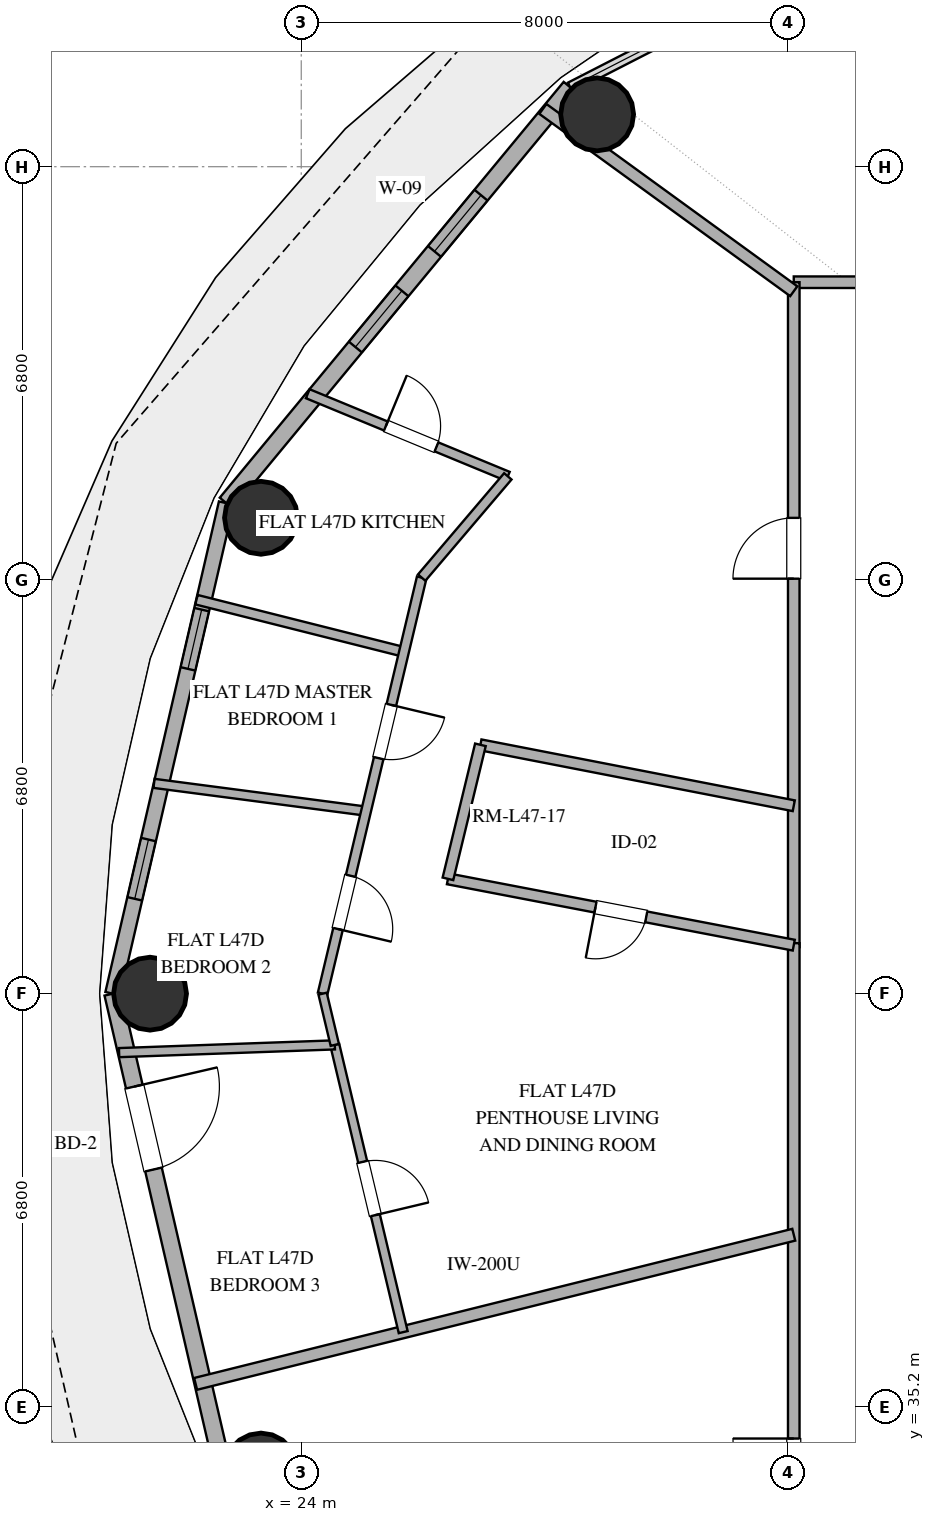
"""IFC4 building model, lengths in metres.
Left out: names, types, materials, properties, quantities, classifications, styles, units other than length and angle.
Written with IfcOpenShell. Run it as: python <this file> out.ifc"""

import sys

from ifc_helpers import new_model, si_unit, direction, frame, frame_2d, origin, origin_2d, place, context, subcontext, project, spatial, rectangle, hollow_circle, extrude, element, fill, save


model = new_model("IFC4")
c1 = context("Model", 3, precision=1e-05, world=origin(), true_north=direction((0.0, 1.0)))
c2 = subcontext(c1, "Body", "Model", "MODEL_VIEW")
j1 = project(units=[si_unit("LENGTHUNIT", "METRE"), si_unit("PLANEANGLEUNIT", "RADIAN")], contexts=[c1])
p1 = place(None, origin())
s1 = spatial("IfcSite", under=j1, at=p1, CompositionType="ELEMENT")
p2 = place(p1, origin())
s2 = spatial("IfcBuilding", under=s1, at=p2, CompositionType="ELEMENT")
p3 = place(p2, frame((0.0, 0.0, 186.6)))
s3 = spatial("IfcBuildingStorey", under=s2, at=p3, CompositionType="ELEMENT", Elevation=186.6)
for number, where, z_axis, x_axis in (
    (1, (28.866, 56.46, 0.0), (0.0, 0.0, 1.0), (1.0, 0.0, 0.0)),
    (2, (23.338, 49.826, 0.0), (0.0, 0.0, 1.0), (1.0, 0.0, 0.0)),
    (3, (21.513, 42.0, 0.0), (0.0, 0.0, 1.0), (1.0, 0.0, 0.0)),
    (4, (23.338, 34.174, 0.0), (0.0, 0.0, 1.0), (1.0, 0.0, 0.0)),
):
    element("IfcColumn", number, at=place(p3, frame(where, z_axis=z_axis, x_axis=x_axis)), inside=s3, PredefinedType="COLUMN", context=c2, shape_type="SweptSolid", body=[
        extrude(hollow_circle(Radius=0.6, WallThickness=0.032, at=origin_2d()), origin(), (0.0, 0.0, 1.0), 3.38),
    ])
p4 = place(p3, frame((28.424, 56.906, 0.0), z_axis=(0.0, 0.0, 1.0), x_axis=(-0.637333477683, -0.770588111915, 0.0)))
e5 = element("IfcWall", 5, at=p4, inside=s3, PredefinedType="SOLIDWALL", context=c2, shape_type="SweptSolid", body=[
    extrude(rectangle(XDim=8.875, YDim=0.28, at=frame_2d((4.438, 0.0))), origin(), (0.0, 0.0, 1.0), 3.38),
])
p5 = place(p4, frame((2.302, 0.0, 0.85)))
e6 = element("IfcOpeningElement", 6, at=p5, cuts=e5, PredefinedType="OPENING", context=c2, shape_type="SweptSolid", body=[
    extrude(rectangle(XDim=1.2, YDim=1.8, at=frame_2d((0.6, 0.9))), frame((0.0, 0.15, 0.0), z_axis=(0.0, -1.0, 0.0), x_axis=(1.0, 0.0, 0.0)), (0.0, 0.0, 1.0), 0.3),
])
p6 = place(p4, frame((4.344, 0.0, 0.85)))
e7 = element("IfcOpeningElement", 7, at=p6, cuts=e5, PredefinedType="OPENING", context=c2, shape_type="SweptSolid", body=[
    extrude(rectangle(XDim=1.2, YDim=1.8, at=frame_2d((0.6, 0.9))), frame((0.0, 0.15, 0.0), z_axis=(0.0, -1.0, 0.0), x_axis=(1.0, 0.0, 0.0)), (0.0, 0.0, 1.0), 0.3),
])
p7 = place(p3, frame((22.768, 50.067, 0.0), z_axis=(0.0, 0.0, 1.0), x_axis=(-0.225473184558, -0.974249374157, 0.0)))
e8 = element("IfcWall", 8, at=p7, inside=s3, PredefinedType="SOLIDWALL", context=c2, shape_type="SweptSolid", body=[
    extrude(rectangle(XDim=8.28, YDim=0.25, at=frame_2d((4.14, 0.0))), origin(), (0.0, 0.0, 1.0), 3.38),
])
p8 = place(p7, frame((1.798, 0.0, 0.35)))
e9 = element("IfcOpeningElement", 9, at=p8, cuts=e8, PredefinedType="OPENING", context=c2, shape_type="SweptSolid", body=[
    extrude(rectangle(XDim=1.0, YDim=1.05, at=frame_2d((0.5, 0.525))), frame((0.0, 0.135, 0.0), z_axis=(0.0, -1.0, 0.0), x_axis=(1.0, 0.0, 0.0)), (0.0, 0.0, 1.0), 0.27),
])
p9 = place(p7, frame((5.679, 0.0, 1.42)))
e10 = element("IfcOpeningElement", 10, at=p9, cuts=e8, PredefinedType="OPENING", context=c2, shape_type="SweptSolid", body=[
    extrude(rectangle(XDim=1.0, YDim=1.05, at=frame_2d((0.5, 0.525))), frame((0.0, 0.135, 0.0), z_axis=(0.0, -1.0, 0.0), x_axis=(1.0, 0.0, 0.0)), (0.0, 0.0, 1.0), 0.27),
])
p10 = place(p3, frame((20.901, 42.0, 0.0), z_axis=(0.0, 0.0, 1.0), x_axis=(0.225473184558, -0.974249374157, 0.0)))
e11 = element("IfcWall", 11, at=p10, inside=s3, PredefinedType="SOLIDWALL", context=c2, shape_type="SweptSolid", body=[
    extrude(rectangle(XDim=8.28, YDim=0.28, at=frame_2d((4.14, 0.0))), origin(), (0.0, 0.0, 1.0), 3.38),
])
p11 = place(p10, frame((1.568, 0.0, 0.0)))
e12 = element("IfcOpeningElement", 12, at=p11, cuts=e11, PredefinedType="OPENING", context=c2, shape_type="SweptSolid", body=[
    extrude(rectangle(XDim=1.4, YDim=2.2, at=frame_2d((0.7, 1.1))), frame((0.0, 0.15, 0.0), z_axis=(0.0, -1.0, 0.0), x_axis=(1.0, 0.0, 0.0)), (0.0, 0.0, 1.0), 0.3),
])
p12 = place(p3, frame((32.1, 53.7, 0.0), z_axis=(0.0, 0.0, 1.0), x_axis=(1.0, 0.0, 0.0)))
e13 = element("IfcWall", 13, at=p12, inside=s3, PredefinedType="PARTITIONING", context=c2, shape_type="SweptSolid", body=[
    extrude(rectangle(XDim=13.016, YDim=0.19, at=frame_2d((6.508, 0.0))), origin(), (0.0, 0.0, 1.0), 2.74),
])
p13 = place(p12, frame((4.199, 0.0, 0.0)))
e14 = element("IfcOpeningElement", 14, at=p13, cuts=e13, PredefinedType="OPENING", context=c2, shape_type="SweptSolid", body=[
    extrude(rectangle(XDim=1.0, YDim=2.2, at=frame_2d((0.5, 1.1))), frame((0.0, 0.105, 0.0), z_axis=(0.0, -1.0, 0.0), x_axis=(1.0, 0.0, 0.0)), (0.0, 0.0, 1.0), 0.21),
])
p14 = place(p3, frame((32.1, 42.765, 0.0), z_axis=(0.0, 0.0, 1.0), x_axis=(0.0, 1.0, 0.0)))
e15 = element("IfcWall", 15, at=p14, inside=s3, PredefinedType="PARTITIONING", context=c2, shape_type="SweptSolid", body=[
    extrude(rectangle(XDim=10.935, YDim=0.19, at=frame_2d((5.467, 0.0))), origin(), (0.0, 0.0, 1.0), 2.74),
])
p15 = place(p14, frame((6.06, 0.0, 0.0)))
e16 = element("IfcOpeningElement", 16, at=p15, cuts=e15, PredefinedType="OPENING", context=c2, shape_type="SweptSolid", body=[
    extrude(rectangle(XDim=1.0, YDim=2.2, at=frame_2d((0.5, 1.1))), frame((0.0, 0.105, 0.0), z_axis=(0.0, -1.0, 0.0), x_axis=(1.0, 0.0, 0.0)), (0.0, 0.0, 1.0), 0.21),
])
p16 = place(p3, frame((32.1, 30.3, 0.0), z_axis=(0.0, 0.0, 1.0), x_axis=(0.0, 1.0, 0.0)))
e17 = element("IfcWall", 17, at=p16, inside=s3, PredefinedType="PARTITIONING", context=c2, shape_type="SweptSolid", body=[
    extrude(rectangle(XDim=12.53, YDim=0.19, at=frame_2d((6.265, 0.0))), origin(), (0.0, 0.0, 1.0), 2.74),
])
p17 = place(p16, frame((3.384, 0.0, 0.0)))
e18 = element("IfcOpeningElement", 18, at=p17, cuts=e17, PredefinedType="OPENING", context=c2, shape_type="SweptSolid", body=[
    extrude(rectangle(XDim=1.0, YDim=2.2, at=frame_2d((0.5, 1.1))), frame((0.0, 0.105, 0.0), z_axis=(0.0, -1.0, 0.0), x_axis=(1.0, 0.0, 0.0)), (0.0, 0.0, 1.0), 0.21),
])
p18 = place(p3, frame((22.263, 35.583, 0.0), z_axis=(0.0, 0.0, 1.0), x_axis=(0.970298114693, 0.241912315983, 0.0)))
e19 = element("IfcWall", 19, at=p18, inside=s3, PredefinedType="PARTITIONING", context=c2, shape_type="SweptSolid", body=[
    extrude(rectangle(XDim=10.138, YDim=0.2, at=frame_2d((5.069, 0.0))), origin(), (0.0, 0.0, 1.0), 2.74),
])
p19 = place(p3, frame((32.1, 42.798, 0.0), z_axis=(0.0, 0.0, 1.0), x_axis=(-0.982107940525, 0.188318860333, 0.0)))
e20 = element("IfcWall", 20, at=p19, inside=s3, PredefinedType="PLUMBINGWALL", context=c2, shape_type="SweptSolid", body=[
    extrude(rectangle(XDim=5.791, YDim=0.18, at=frame_2d((2.896, 0.0))), origin(), (0.0, 0.0, 1.0), 2.74),
])
p20 = place(p19, frame((2.47, 0.0, 0.0)))
e21 = element("IfcOpeningElement", 21, at=p20, cuts=e20, PredefinedType="OPENING", context=c2, shape_type="SweptSolid", body=[
    extrude(rectangle(XDim=0.85, YDim=2.1, at=frame_2d((0.425, 1.05))), frame((0.0, 0.1, 0.0), z_axis=(0.0, -1.0, 0.0), x_axis=(1.0, 0.0, 0.0)), (0.0, 0.0, 1.0), 0.2),
])
p21 = place(p3, frame((26.947, 46.092, 0.0), z_axis=(0.0, 0.0, 1.0), x_axis=(0.981628698507, -0.190801200908, 0.0)))
e22 = element("IfcWall", 22, at=p21, inside=s3, PredefinedType="PLUMBINGWALL", context=c2, shape_type="SweptSolid", body=[
    extrude(rectangle(XDim=5.25, YDim=0.18, at=frame_2d((2.625, 0.0))), origin(), (0.0, 0.0, 1.0), 2.74),
])
p22 = place(p3, frame((32.1, 53.552, 0.0), z_axis=(0.0, 0.0, 1.0), x_axis=(-0.809023715391, 0.587776001496, 0.0)))
e23 = element("IfcWall", 23, at=p22, inside=s3, PredefinedType="PARTITIONING", context=c2, shape_type="SweptSolid", body=[
    extrude(rectangle(XDim=5.1, YDim=0.2, at=frame_2d((2.55, 0.0))), origin(), (0.0, 0.0, 1.0), 2.74),
])
p23 = place(p3, frame((24.552, 41.158, 0.0), z_axis=(0.0, 0.0, 1.0), x_axis=(0.231625058686, -0.972805135774, 0.0)))
e24 = element("IfcWall", 24, at=p23, inside=s3, PredefinedType="PARTITIONING", context=c2, shape_type="SweptSolid", body=[
    extrude(rectangle(XDim=4.856, YDim=0.15, at=frame_2d((2.428, 0.0))), origin(), (0.0, 0.0, 1.0), 2.74),
])
p24 = place(p23, frame((1.978, 0.0, 0.0)))
e25 = element("IfcOpeningElement", 25, at=p24, cuts=e24, PredefinedType="OPENING", context=c2, shape_type="SweptSolid", body=[
    extrude(rectangle(XDim=0.9, YDim=2.1, at=frame_2d((0.45, 1.05))), frame((0.0, 0.085, 0.0), z_axis=(0.0, -1.0, 0.0), x_axis=(1.0, 0.0, 0.0)), (0.0, 0.0, 1.0), 0.17),
])
p25 = place(p3, frame((24.107, 51.866, 0.0), z_axis=(0.0, 0.0, 1.0), x_axis=(0.924309814848, -0.381642982611, 0.0)))
e26 = element("IfcWall", 26, at=p25, inside=s3, PredefinedType="PLUMBINGWALL", context=c2, shape_type="SweptSolid", body=[
    extrude(rectangle(XDim=3.56, YDim=0.16, at=frame_2d((1.78, 0.0))), origin(), (0.0, 0.0, 1.0), 2.74),
])
p26 = place(p25, frame((1.39, 0.0, 0.0)))
e27 = element("IfcOpeningElement", 27, at=p26, cuts=e26, PredefinedType="OPENING", context=c2, shape_type="SweptSolid", body=[
    extrude(rectangle(XDim=0.9, YDim=2.1, at=frame_2d((0.45, 1.05))), frame((0.0, 0.09, 0.0), z_axis=(0.0, -1.0, 0.0), x_axis=(1.0, 0.0, 0.0)), (0.0, 0.0, 1.0), 0.18),
])
p27 = place(p3, frame((24.552, 41.158, 0.0), z_axis=(0.0, 0.0, 1.0), x_axis=(-0.999355385726, -0.035900042072, 0.0)))
e28 = element("IfcWall", 28, at=p27, inside=s3, PredefinedType="PARTITIONING", context=c2, shape_type="SweptSolid", body=[
    extrude(rectangle(XDim=3.55, YDim=0.15, at=frame_2d((1.775, 0.0))), origin(), (0.0, 0.0, 1.0), 2.74),
])
p28 = place(p3, frame((22.277, 48.479, 0.0), z_axis=(0.0, 0.0, 1.0), x_axis=(0.969720683394, -0.244216699259, 0.0)))
e29 = element("IfcWall", 29, at=p28, inside=s3, PredefinedType="PLUMBINGWALL", context=c2, shape_type="SweptSolid", body=[
    extrude(rectangle(XDim=3.519, YDim=0.16, at=frame_2d((1.759, 0.0))), origin(), (0.0, 0.0, 1.0), 2.74),
])
p29 = place(p3, frame((21.579, 45.458, 0.0), z_axis=(0.0, 0.0, 1.0), x_axis=(0.991540311483, -0.129799116729, 0.0)))
e30 = element("IfcWall", 30, at=p29, inside=s3, PredefinedType="PARTITIONING", context=c2, shape_type="SweptSolid", body=[
    extrude(rectangle(XDim=3.517, YDim=0.15, at=frame_2d((1.759, 0.0))), origin(), (0.0, 0.0, 1.0), 2.74),
])
p30 = place(p3, frame((25.981, 48.842, 0.0), z_axis=(0.0, 0.0, 1.0), x_axis=(-0.231658068135, -0.972797275627, 0.0)))
e31 = element("IfcWall", 31, at=p30, inside=s3, PredefinedType="PLUMBINGWALL", context=c2, shape_type="SweptSolid", body=[
    extrude(rectangle(XDim=7.034, YDim=0.16, at=frame_2d((3.517, 0.0))), origin(), (0.0, 0.0, 1.0), 2.74),
])
p31 = place(p30, frame((5.041, 0.0, 0.0)))
e32 = element("IfcOpeningElement", 32, at=p31, cuts=e31, PredefinedType="OPENING", context=c2, shape_type="SweptSolid", body=[
    extrude(rectangle(XDim=0.9, YDim=2.1, at=frame_2d((0.45, 1.05))), frame((0.0, 0.09, 0.0), z_axis=(0.0, -1.0, 0.0), x_axis=(1.0, 0.0, 0.0)), (0.0, 0.0, 1.0), 0.18),
])
p32 = place(p30, frame((2.153, 0.0, 0.0)))
e33 = element("IfcOpeningElement", 33, at=p32, cuts=e31, PredefinedType="OPENING", context=c2, shape_type="SweptSolid", body=[
    extrude(rectangle(XDim=0.9, YDim=2.1, at=frame_2d((0.45, 1.05))), frame((0.0, 0.09, 0.0), z_axis=(0.0, -1.0, 0.0), x_axis=(1.0, 0.0, 0.0)), (0.0, 0.0, 1.0), 0.18),
])
p33 = place(p3, frame((26.413, 43.888, 0.0), z_axis=(0.0, 0.0, 1.0), x_axis=(0.235461357856, 0.971883711643, 0.0)))
e34 = element("IfcWall", 34, at=p33, inside=s3, PredefinedType="PLUMBINGWALL", context=c2, shape_type="SweptSolid", body=[
    extrude(rectangle(XDim=2.268, YDim=0.18, at=frame_2d((1.134, 0.0))), origin(), (0.0, 0.0, 1.0), 2.74),
])
p34 = place(p3, frame((27.397, 50.508, 0.0), z_axis=(0.0, 0.0, 1.0), x_axis=(-0.647982213408, -0.761655467457, 0.0)))
e35 = element("IfcWall", 35, at=p34, inside=s3, PredefinedType="PLUMBINGWALL", context=c2, shape_type="SweptSolid", body=[
    extrude(rectangle(XDim=2.186, YDim=0.16, at=frame_2d((1.093, 0.0))), origin(), (0.0, 0.0, 1.0), 2.74),
])
p35 = place(p3, frame((24.351, 42.0, 0.0), z_axis=(0.0, 0.0, 1.0), x_axis=(0.231569683902, -0.972818318854, 0.0)))
e36 = element("IfcWall", 36, at=p35, inside=s3, PredefinedType="PARTITIONING", context=c2, shape_type="SweptSolid", body=[
    extrude(rectangle(XDim=0.865, YDim=0.14, at=frame_2d((0.433, 0.0))), origin(), (0.0, 0.0, 1.0), 2.74),
])
p36 = place(p5, origin())
e37 = element("IfcWindow", 37, at=p36, inside=s3, PartitioningType="SINGLE_PANEL", PredefinedType="WINDOW", context=c2, shape_type="SweptSolid", body=[
    extrude(rectangle(XDim=1.2, YDim=1.8, at=frame_2d((0.6, 0.9))), frame((0.0, 0.03, 0.0), z_axis=(0.0, -1.0, 0.0), x_axis=(1.0, 0.0, 0.0)), (0.0, 0.0, 1.0), 0.06),
])
fill(e6, e37)
p37 = place(p6, origin())
e38 = element("IfcWindow", 38, at=p37, inside=s3, PartitioningType="SINGLE_PANEL", PredefinedType="WINDOW", context=c2, shape_type="SweptSolid", body=[
    extrude(rectangle(XDim=1.2, YDim=1.8, at=frame_2d((0.6, 0.9))), frame((0.0, 0.03, 0.0), z_axis=(0.0, -1.0, 0.0), x_axis=(1.0, 0.0, 0.0)), (0.0, 0.0, 1.0), 0.06),
])
fill(e7, e38)
p38 = place(p11, origin())
e39 = element("IfcDoor", 39, at=p38, inside=s3, OperationType="SINGLE_SWING_LEFT", PredefinedType="DOOR", context=c2, shape_type="SweptSolid", body=[
    extrude(rectangle(XDim=1.4, YDim=2.2, at=frame_2d((0.7, 1.1))), frame((0.0, 0.025, 0.0), z_axis=(0.0, -1.0, 0.0), x_axis=(1.0, 0.0, 0.0)), (0.0, 0.0, 1.0), 0.05),
])
fill(e12, e39)
p39 = place(p8, origin())
e40 = element("IfcWindow", 40, at=p39, inside=s3, PartitioningType="SINGLE_PANEL", PredefinedType="WINDOW", context=c2, shape_type="SweptSolid", body=[
    extrude(rectangle(XDim=1.0, YDim=1.05, at=frame_2d((0.5, 0.525))), frame((0.0, 0.03, 0.0), z_axis=(0.0, -1.0, 0.0), x_axis=(1.0, 0.0, 0.0)), (0.0, 0.0, 1.0), 0.06),
])
fill(e9, e40)
p40 = place(p9, origin())
e41 = element("IfcWindow", 41, at=p40, inside=s3, PartitioningType="SINGLE_PANEL", PredefinedType="WINDOW", context=c2, shape_type="SweptSolid", body=[
    extrude(rectangle(XDim=1.0, YDim=1.05, at=frame_2d((0.5, 0.525))), frame((0.0, 0.03, 0.0), z_axis=(0.0, -1.0, 0.0), x_axis=(1.0, 0.0, 0.0)), (0.0, 0.0, 1.0), 0.06),
])
fill(e10, e41)
p41 = place(p15, origin())
e42 = element("IfcDoor", 42, at=p41, inside=s3, OperationType="SINGLE_SWING_LEFT", PredefinedType="DOOR", context=c2, shape_type="SweptSolid", body=[
    extrude(rectangle(XDim=1.0, YDim=2.2, at=frame_2d((0.5, 1.1))), frame((0.0, 0.025, 0.0), z_axis=(0.0, -1.0, 0.0), x_axis=(1.0, 0.0, 0.0)), (0.0, 0.0, 1.0), 0.05),
])
fill(e16, e42)
p42 = place(p17, origin())
e43 = element("IfcDoor", 43, at=p42, inside=s3, OperationType="SINGLE_SWING_RIGHT", PredefinedType="DOOR", context=c2, shape_type="SweptSolid", body=[
    extrude(rectangle(XDim=1.0, YDim=2.2, at=frame_2d((0.5, 1.1))), frame((0.0, 0.025, 0.0), z_axis=(0.0, -1.0, 0.0), x_axis=(1.0, 0.0, 0.0)), (0.0, 0.0, 1.0), 0.05),
])
fill(e18, e43)
p43 = place(p20, origin())
e44 = element("IfcDoor", 44, at=p43, inside=s3, OperationType="SINGLE_SWING_RIGHT", PredefinedType="DOOR", context=c2, shape_type="SweptSolid", body=[
    extrude(rectangle(XDim=0.85, YDim=2.1, at=frame_2d((0.425, 1.05))), frame((0.0, 0.025, 0.0), z_axis=(0.0, -1.0, 0.0), x_axis=(1.0, 0.0, 0.0)), (0.0, 0.0, 1.0), 0.05),
])
fill(e21, e44)
p44 = place(p24, origin())
e45 = element("IfcDoor", 45, at=p44, inside=s3, OperationType="SINGLE_SWING_RIGHT", PredefinedType="DOOR", context=c2, shape_type="SweptSolid", body=[
    extrude(rectangle(XDim=0.9, YDim=2.1, at=frame_2d((0.45, 1.05))), frame((0.0, 0.025, 0.0), z_axis=(0.0, -1.0, 0.0), x_axis=(1.0, 0.0, 0.0)), (0.0, 0.0, 1.0), 0.05),
])
fill(e25, e45)
p45 = place(p26, origin())
e46 = element("IfcDoor", 46, at=p45, inside=s3, OperationType="SINGLE_SWING_LEFT", PredefinedType="DOOR", context=c2, shape_type="SweptSolid", body=[
    extrude(rectangle(XDim=0.9, YDim=2.1, at=frame_2d((0.45, 1.05))), frame((0.0, 0.025, 0.0), z_axis=(0.0, -1.0, 0.0), x_axis=(1.0, 0.0, 0.0)), (0.0, 0.0, 1.0), 0.05),
])
fill(e27, e46)
p46 = place(p31, origin())
e47 = element("IfcDoor", 47, at=p46, inside=s3, OperationType="SINGLE_SWING_RIGHT", PredefinedType="DOOR", context=c2, shape_type="SweptSolid", body=[
    extrude(rectangle(XDim=0.9, YDim=2.1, at=frame_2d((0.45, 1.05))), frame((0.0, 0.025, 0.0), z_axis=(0.0, -1.0, 0.0), x_axis=(1.0, 0.0, 0.0)), (0.0, 0.0, 1.0), 0.05),
])
fill(e32, e47)
p47 = place(p32, origin())
e48 = element("IfcDoor", 48, at=p47, inside=s3, OperationType="SINGLE_SWING_LEFT", PredefinedType="DOOR", context=c2, shape_type="SweptSolid", body=[
    extrude(rectangle(XDim=0.9, YDim=2.1, at=frame_2d((0.45, 1.05))), frame((0.0, 0.025, 0.0), z_axis=(0.0, -1.0, 0.0), x_axis=(1.0, 0.0, 0.0)), (0.0, 0.0, 1.0), 0.05),
])
fill(e33, e48)
save(model, sys.argv[1])
